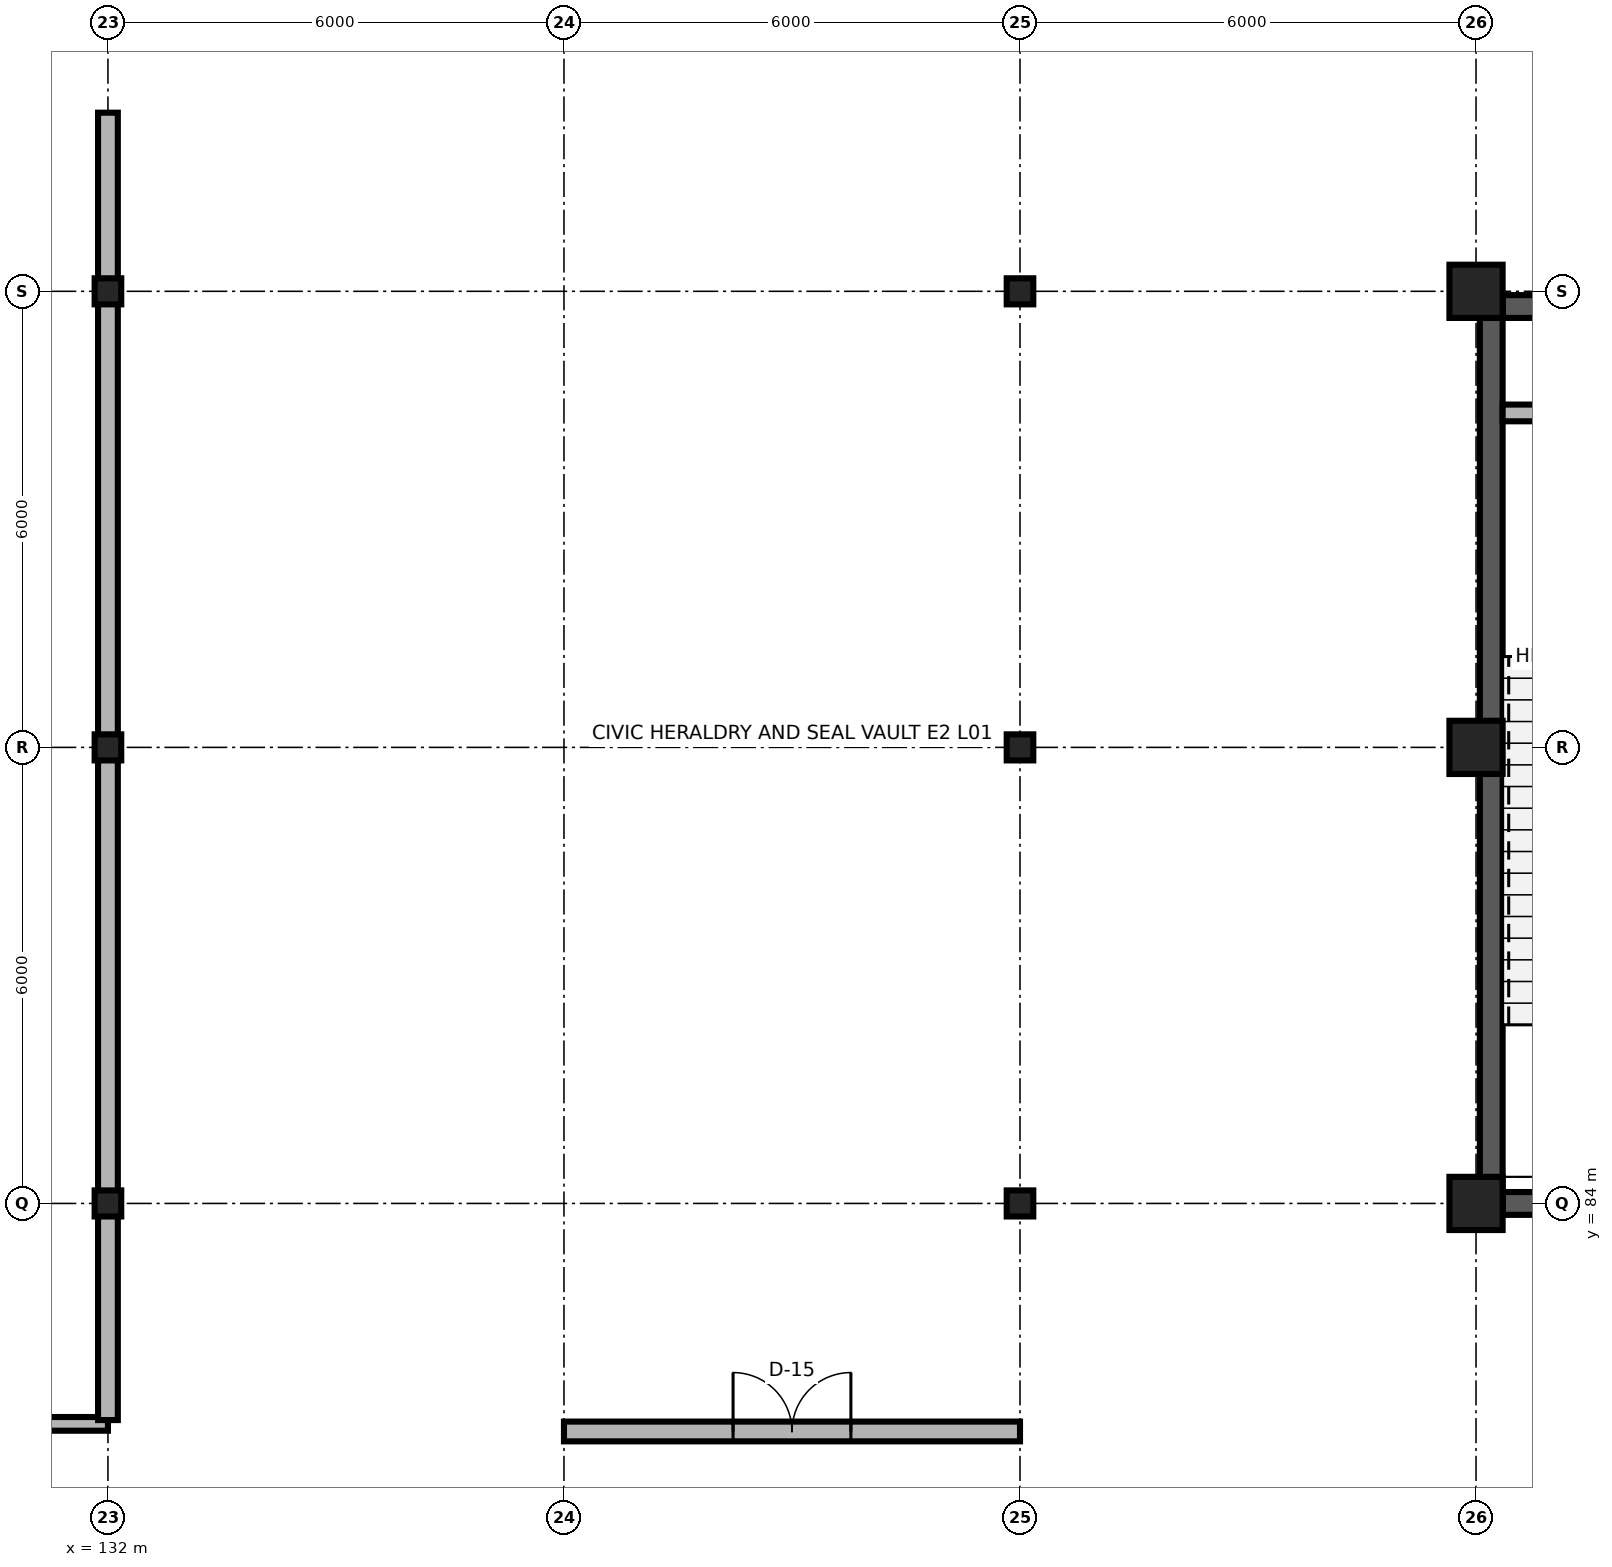
"""IFC4 building model, lengths in metres.
Left out: names, types, materials, properties, quantities, classifications, styles, units other than length and angle.
Written with IfcOpenShell. Run it as: python <this file> out.ifc"""

import sys

from ifc_helpers import new_model, si_unit, direction, frame, frame_2d, origin, origin_2d, place, context, subcontext, project, spatial, rectangle, i_section, extrude, element, fill, save


model = new_model("IFC4")
c1 = context("Model", 3, precision=1e-05, world=origin(), true_north=direction((0.0, 1.0)))
c2 = subcontext(c1, "Body", "Model", "MODEL_VIEW")
j1 = project(units=[si_unit("LENGTHUNIT", "METRE"), si_unit("PLANEANGLEUNIT", "RADIAN")], contexts=[c1])
p1 = place(None, origin())
s1 = spatial("IfcSite", under=j1, at=p1, CompositionType="ELEMENT")
p2 = place(p1, origin())
s2 = spatial("IfcBuilding", under=s1, at=p2, CompositionType="ELEMENT")
p3 = place(p2, origin())
s3 = spatial("IfcBuildingStorey", under=s2, at=p3, CompositionType="ELEMENT", Elevation=0.0)
for number, where, z_axis, x_axis in (
    (1, (132.0, 84.0, 0.0), (0.0, 0.0, 1.0), (1.0, 0.0, 0.0)),
    (2, (144.0, 84.0, 0.0), (0.0, 0.0, 1.0), (1.0, 0.0, 0.0)),
):
    element("IfcColumn", number, at=place(p3, frame(where, z_axis=z_axis, x_axis=x_axis)), inside=s3, PredefinedType="COLUMN", context=c2, shape_type="SweptSolid", body=[
        extrude(i_section(OverallWidth=0.35, OverallDepth=0.343, WebThickness=0.01, FlangeThickness=0.015, FilletRadius=0.02, at=origin_2d()), origin(), (0.0, 0.0, 1.0), 6.0),
    ])
p4 = place(p3, frame((150.0, 84.0, 0.0), z_axis=(0.0, 0.0, 1.0), x_axis=(1.0, 0.0, 0.0)))
e3 = element("IfcColumn", 3, at=p4, inside=s3, PredefinedType="COLUMN", context=c2, shape_type="SweptSolid", body=[
    extrude(rectangle(XDim=0.7, YDim=0.7, at=origin_2d()), origin(), (0.0, 0.0, 1.0), 6.0),
])
for number, where, z_axis, x_axis in (
    (4, (132.0, 90.0, 0.0), (0.0, 0.0, 1.0), (1.0, 0.0, 0.0)),
    (5, (144.0, 90.0, 0.0), (0.0, 0.0, 1.0), (1.0, 0.0, 0.0)),
):
    element("IfcColumn", number, at=place(p3, frame(where, z_axis=z_axis, x_axis=x_axis)), inside=s3, PredefinedType="COLUMN", context=c2, shape_type="SweptSolid", body=[
        extrude(i_section(OverallWidth=0.35, OverallDepth=0.343, WebThickness=0.01, FlangeThickness=0.015, FilletRadius=0.02, at=origin_2d()), origin(), (0.0, 0.0, 1.0), 6.0),
    ])
p5 = place(p3, frame((150.0, 90.0, 0.0), z_axis=(0.0, 0.0, 1.0), x_axis=(1.0, 0.0, 0.0)))
e6 = element("IfcColumn", 6, at=p5, inside=s3, PredefinedType="COLUMN", context=c2, shape_type="SweptSolid", body=[
    extrude(rectangle(XDim=0.7, YDim=0.7, at=origin_2d()), origin(), (0.0, 0.0, 1.0), 6.0),
])
for number, where, z_axis, x_axis in (
    (7, (132.0, 96.0, 0.0), (0.0, 0.0, 1.0), (1.0, 0.0, 0.0)),
    (8, (144.0, 96.0, 0.0), (0.0, 0.0, 1.0), (1.0, 0.0, 0.0)),
):
    element("IfcColumn", number, at=place(p3, frame(where, z_axis=z_axis, x_axis=x_axis)), inside=s3, PredefinedType="COLUMN", context=c2, shape_type="SweptSolid", body=[
        extrude(i_section(OverallWidth=0.35, OverallDepth=0.343, WebThickness=0.01, FlangeThickness=0.015, FilletRadius=0.02, at=origin_2d()), origin(), (0.0, 0.0, 1.0), 6.0),
    ])
p6 = place(p3, frame((150.0, 96.0, 0.0), z_axis=(0.0, 0.0, 1.0), x_axis=(1.0, 0.0, 0.0)))
e9 = element("IfcColumn", 9, at=p6, inside=s3, PredefinedType="COLUMN", context=c2, shape_type="SweptSolid", body=[
    extrude(rectangle(XDim=0.7, YDim=0.7, at=origin_2d()), origin(), (0.0, 0.0, 1.0), 6.0),
])
p7 = place(p3, frame((150.35, 84.0, 0.0), z_axis=(0.0, 0.0, 1.0), x_axis=(1.0, 0.0, 0.0)))
e10 = element("IfcWall", 10, at=p7, inside=s3, PredefinedType="SHEAR", context=c2, shape_type="SweptSolid", body=[
    extrude(rectangle(XDim=5.3, YDim=0.3, at=frame_2d((2.65, 0.0))), origin(), (0.0, 0.0, 1.0), 5.76),
])
p8 = place(p7, frame((1.925, 0.0, 0.0)))
e11 = element("IfcOpeningElement", 11, at=p8, cuts=e10, PredefinedType="OPENING", context=c2, shape_type="SweptSolid", body=[
    extrude(rectangle(XDim=1.45, YDim=2.25, at=frame_2d((0.725, 1.125))), frame((0.0, 0.165, 0.0), z_axis=(0.0, -1.0, 0.0), x_axis=(1.0, 0.0, 0.0)), (0.0, 0.0, 1.0), 0.33),
])
p9 = place(p3, frame((150.35, 95.8, 0.0), z_axis=(0.0, 0.0, 1.0), x_axis=(1.0, 0.0, 0.0)))
e12 = element("IfcWall", 12, at=p9, inside=s3, PredefinedType="SHEAR", context=c2, shape_type="SweptSolid", body=[
    extrude(rectangle(XDim=5.3, YDim=0.3, at=frame_2d((2.65, 0.0))), origin(), (0.0, 0.0, 1.0), 5.76),
])
p10 = place(p3, frame((150.2, 84.0, 0.0), z_axis=(0.0, 0.0, 1.0), x_axis=(0.0, 1.0, 0.0)))
e13 = element("IfcWall", 13, at=p10, inside=s3, PredefinedType="SHEAR", context=c2, shape_type="SweptSolid", body=[
    extrude(rectangle(XDim=11.8, YDim=0.3, at=frame_2d((5.9, 0.0))), origin(), (0.0, 0.0, 1.0), 5.76),
])
p11 = place(p3, frame((150.35, 94.4, 0.0), z_axis=(0.0, 0.0, 1.0), x_axis=(1.0, 0.0, 0.0)))
e14 = element("IfcWall", 14, at=p11, inside=s3, PredefinedType="PARTITIONING", context=c2, shape_type="SweptSolid", body=[
    extrude(rectangle(XDim=1.1, YDim=0.22, at=frame_2d((0.55, 0.0))), origin(), (0.0, 0.0, 1.0), 5.76),
])
p12 = place(p3, frame((120.0, 81.1, 0.0), z_axis=(0.0, 0.0, 1.0), x_axis=(1.0, 0.0, 0.0)))
e15 = element("IfcWall", 15, at=p12, inside=s3, PredefinedType="PARTITIONING", context=c2, shape_type="SweptSolid", body=[
    extrude(rectangle(XDim=12.0, YDim=0.18, at=frame_2d((6.0, 0.0))), origin(), (0.0, 0.0, 1.0), 5.76),
])
p13 = place(p12, frame((5.125, 0.0, 0.0)))
e16 = element("IfcOpeningElement", 16, at=p13, cuts=e15, PredefinedType="OPENING", context=c2, shape_type="SweptSolid", body=[
    extrude(rectangle(XDim=1.75, YDim=2.55, at=frame_2d((0.875, 1.275))), frame((0.0, 0.105, 0.0), z_axis=(0.0, -1.0, 0.0), x_axis=(1.0, 0.0, 0.0)), (0.0, 0.0, 1.0), 0.21),
])
p14 = place(p3, frame((138.0, 81.0, 0.0), z_axis=(0.0, 0.0, 1.0), x_axis=(1.0, 0.0, 0.0)))
e17 = element("IfcWall", 17, at=p14, inside=s3, PredefinedType="PARTITIONING", context=c2, shape_type="SweptSolid", body=[
    extrude(rectangle(XDim=6.0, YDim=0.26, at=frame_2d((3.0, 0.0))), origin(), (0.0, 0.0, 1.0), 5.76),
])
p15 = place(p14, frame((2.225, 0.0, 0.0)))
e18 = element("IfcOpeningElement", 18, at=p15, cuts=e17, PredefinedType="OPENING", context=c2, shape_type="SweptSolid", body=[
    extrude(rectangle(XDim=1.55, YDim=2.3, at=frame_2d((0.775, 1.15))), frame((0.0, 0.145, 0.0), z_axis=(0.0, -1.0, 0.0), x_axis=(1.0, 0.0, 0.0)), (0.0, 0.0, 1.0), 0.29),
])
p16 = place(p3, frame((132.0, 81.15, 0.0), z_axis=(0.0, 0.0, 1.0), x_axis=(0.0, 1.0, 0.0)))
e19 = element("IfcWall", 19, at=p16, inside=s3, PredefinedType="PARTITIONING", context=c2, shape_type="SweptSolid", body=[
    extrude(rectangle(XDim=17.2, YDim=0.26, at=frame_2d((8.6, 0.0))), origin(), (0.0, 0.0, 1.0), 5.32),
])
p17 = place(p15, origin())
e20 = element("IfcDoor", 20, at=p17, inside=s3, OperationType="DOUBLE_DOOR_SINGLE_SWING", PredefinedType="DOOR", context=c2, shape_type="SweptSolid", body=[
    extrude(rectangle(XDim=1.55, YDim=2.3, at=frame_2d((0.775, 1.15))), frame((0.0, 0.025, 0.0), z_axis=(0.0, -1.0, 0.0), x_axis=(1.0, 0.0, 0.0)), (0.0, 0.0, 1.0), 0.05),
])
fill(e18, e20)
save(model, sys.argv[1])
